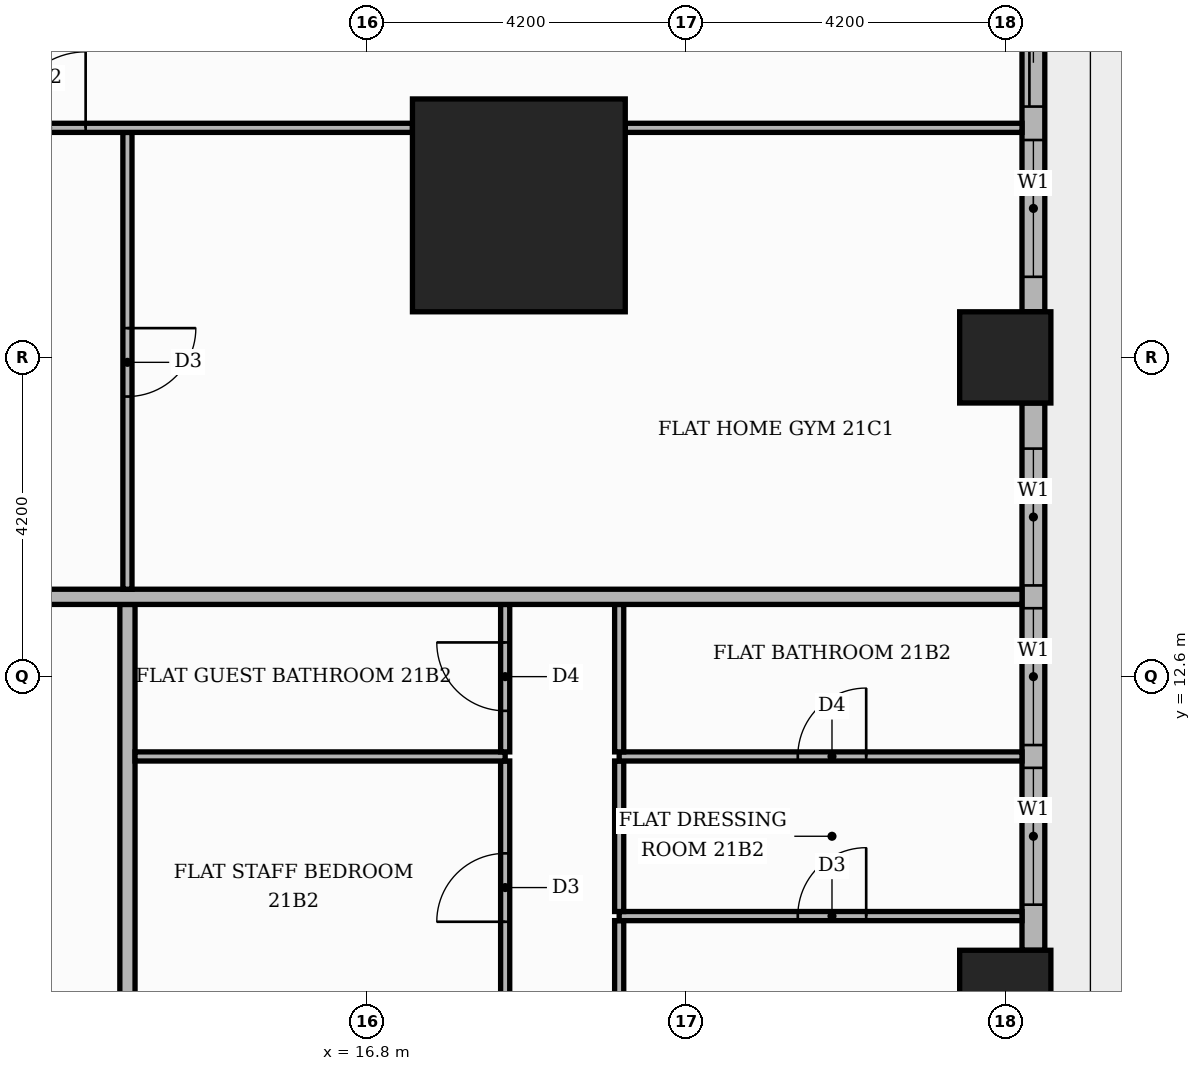
"""IFC4 building model, lengths in metres.
Left out: names, types, materials, properties, quantities, classifications, styles, units other than length and angle.
Written with IfcOpenShell. Run it as: python <this file> out.ifc"""

import sys

from ifc_helpers import new_model, si_unit, direction, frame, frame_2d, origin, origin_2d, place, context, subcontext, project, spatial, rectangle, extrude, element, fill, save


model = new_model("IFC4")
c1 = context("Model", 3, precision=1e-05, world=origin(), true_north=direction((0.0, 1.0)))
c2 = subcontext(c1, "Body", "Model", "MODEL_VIEW")
j1 = project(units=[si_unit("LENGTHUNIT", "METRE"), si_unit("PLANEANGLEUNIT", "RADIAN")], contexts=[c1])
p1 = place(None, origin())
s1 = spatial("IfcSite", under=j1, at=p1, CompositionType="ELEMENT")
p2 = place(p1, origin())
s2 = spatial("IfcBuilding", under=s1, at=p2, CompositionType="ELEMENT")
p3 = place(p2, frame((0.0, 0.0, 90.9)))
s3 = spatial("IfcBuildingStorey", under=s2, at=p3, CompositionType="ELEMENT", Elevation=90.9)
p4 = place(p3, frame((18.8, 18.8, 0.0), z_axis=(0.0, 0.0, 1.0), x_axis=(1.0, 0.0, 0.0)))
e1 = element("IfcColumn", 1, at=p4, inside=s3, PredefinedType="COLUMN", context=c2, shape_type="SweptSolid", body=[
    extrude(rectangle(XDim=2.8, YDim=2.8, at=origin_2d()), origin(), (0.0, 0.0, 1.0), 3.9),
])
for number, where, z_axis, x_axis in (
    (2, (25.2, 8.4, 0.0), (0.0, 0.0, 1.0), (1.0, 0.0, 0.0)),
    (3, (25.2, 16.8, 0.0), (0.0, 0.0, 1.0), (1.0, 0.0, 0.0)),
):
    element("IfcColumn", number, at=place(p3, frame(where, z_axis=z_axis, x_axis=x_axis)), inside=s3, PredefinedType="COLUMN", context=c2, shape_type="SweptSolid", body=[
        extrude(rectangle(XDim=1.2, YDim=1.2, at=origin_2d()), origin(), (0.0, 0.0, 1.0), 3.9),
    ])
p5 = place(p3, frame((25.57, 9.0, 0.0), z_axis=(0.0, 0.0, 1.0), x_axis=(0.0, 1.0, 0.0)))
e4 = element("IfcWall", 4, at=p5, inside=s3, PredefinedType="STANDARD", context=c2, shape_type="SweptSolid", body=[
    extrude(rectangle(XDim=7.2, YDim=0.3, at=frame_2d((3.6, 0.0))), origin(), (0.0, 0.0, 1.0), 3.48),
])
p6 = place(p5, frame((0.6, 0.0, 0.9)))
e5 = element("IfcOpeningElement", 5, at=p6, cuts=e4, PredefinedType="OPENING", context=c2, shape_type="SweptSolid", body=[
    extrude(rectangle(XDim=1.8, YDim=2.1, at=frame_2d((0.9, 1.05))), frame((0.0, 0.16, 0.0), z_axis=(0.0, -1.0, 0.0), x_axis=(1.0, 0.0, 0.0)), (0.0, 0.0, 1.0), 0.32),
])
p7 = place(p5, frame((2.7, 0.0, 0.9)))
e6 = element("IfcOpeningElement", 6, at=p7, cuts=e4, PredefinedType="OPENING", context=c2, shape_type="SweptSolid", body=[
    extrude(rectangle(XDim=1.8, YDim=2.1, at=frame_2d((0.9, 1.05))), frame((0.0, 0.16, 0.0), z_axis=(0.0, -1.0, 0.0), x_axis=(1.0, 0.0, 0.0)), (0.0, 0.0, 1.0), 0.32),
])
p8 = place(p5, frame((4.8, 0.0, 0.9)))
e7 = element("IfcOpeningElement", 7, at=p8, cuts=e4, PredefinedType="OPENING", context=c2, shape_type="SweptSolid", body=[
    extrude(rectangle(XDim=1.8, YDim=2.1, at=frame_2d((0.9, 1.05))), frame((0.0, 0.16, 0.0), z_axis=(0.0, -1.0, 0.0), x_axis=(1.0, 0.0, 0.0)), (0.0, 0.0, 1.0), 0.32),
])
p9 = place(p3, frame((25.57, 17.4, 0.0), z_axis=(0.0, 0.0, 1.0), x_axis=(0.0, 1.0, 0.0)))
e8 = element("IfcWall", 8, at=p9, inside=s3, PredefinedType="STANDARD", context=c2, shape_type="SweptSolid", body=[
    extrude(rectangle(XDim=4.82, YDim=0.3, at=frame_2d((2.41, 0.0))), origin(), (0.0, 0.0, 1.0), 3.48),
])
p10 = place(p9, frame((2.7, 0.0, 0.0)))
e9 = element("IfcOpeningElement", 9, at=p10, cuts=e8, PredefinedType="OPENING", context=c2, shape_type="SweptSolid", body=[
    extrude(rectangle(XDim=1.8, YDim=2.4, at=frame_2d((0.9, 1.2))), frame((0.0, 0.16, 0.0), z_axis=(0.0, -1.0, 0.0), x_axis=(1.0, 0.0, 0.0)), (0.0, 0.0, 1.0), 0.32),
])
p11 = place(p9, frame((0.46, 0.0, 0.9)))
e10 = element("IfcOpeningElement", 10, at=p11, cuts=e8, PredefinedType="OPENING", context=c2, shape_type="SweptSolid", body=[
    extrude(rectangle(XDim=1.8, YDim=2.1, at=frame_2d((0.9, 1.05))), frame((0.0, 0.16, 0.0), z_axis=(0.0, -1.0, 0.0), x_axis=(1.0, 0.0, 0.0)), (0.0, 0.0, 1.0), 0.32),
])
p12 = place(p3, frame((13.65, -5.15, 0.0), z_axis=(0.0, 0.0, 1.0), x_axis=(0.0, 1.0, 0.0)))
e11 = element("IfcWall", 11, at=p12, inside=s3, PredefinedType="PARTITIONING", context=c2, shape_type="SweptSolid", body=[
    extrude(rectangle(XDim=18.7, YDim=0.2, at=frame_2d((9.35, 0.0))), origin(), (0.0, 0.0, 1.0), 3.48),
])
p13 = place(p12, frame((1.45, 0.0, 0.0)))
e12 = element("IfcOpeningElement", 12, at=p13, cuts=e11, PredefinedType="OPENING", context=c2, shape_type="SweptSolid", body=[
    extrude(rectangle(XDim=1.1, YDim=2.4, at=frame_2d((0.55, 1.2))), frame((0.0, 0.11, 0.0), z_axis=(0.0, -1.0, 0.0), x_axis=(1.0, 0.0, 0.0)), (0.0, 0.0, 1.0), 0.22),
])
p14 = place(p3, frame((20.12, 5.31, 0.0), z_axis=(0.0, 0.0, 1.0), x_axis=(0.0, 1.0, 0.0)))
e13 = element("IfcWall", 13, at=p14, inside=s3, PredefinedType="PARTITIONING", context=c2, shape_type="SweptSolid", body=[
    extrude(rectangle(XDim=4.08, YDim=0.12, at=frame_2d((2.04, 0.0))), origin(), (0.0, 0.0, 1.0), 3.48),
])
p15 = place(p14, frame((1.59, 0.0, 0.0)))
e14 = element("IfcOpeningElement", 14, at=p15, cuts=e13, PredefinedType="OPENING", context=c2, shape_type="SweptSolid", body=[
    extrude(rectangle(XDim=0.9, YDim=2.1, at=frame_2d((0.45, 1.05))), frame((0.0, 0.07, 0.0), z_axis=(0.0, -1.0, 0.0), x_axis=(1.0, 0.0, 0.0)), (0.0, 0.0, 1.0), 0.14),
])
p16 = place(p3, frame((18.62, 8.16, 0.0), z_axis=(0.0, 0.0, 1.0), x_axis=(0.0, 1.0, 0.0)))
e15 = element("IfcWall", 15, at=p16, inside=s3, PredefinedType="PARTITIONING", context=c2, shape_type="SweptSolid", body=[
    extrude(rectangle(XDim=3.33, YDim=0.12, at=frame_2d((1.665, 0.0))), origin(), (0.0, 0.0, 1.0), 3.48),
])
p17 = place(p16, frame((1.215, 0.0, 0.0)))
e16 = element("IfcOpeningElement", 16, at=p17, cuts=e15, PredefinedType="OPENING", context=c2, shape_type="SweptSolid", body=[
    extrude(rectangle(XDim=0.9, YDim=2.1, at=frame_2d((0.45, 1.05))), frame((0.0, 0.07, 0.0), z_axis=(0.0, -1.0, 0.0), x_axis=(1.0, 0.0, 0.0)), (0.0, 0.0, 1.0), 0.14),
])
p18 = place(p3, frame((20.12, 9.45, 0.0), z_axis=(0.0, 0.0, 1.0), x_axis=(1.0, 0.0, 0.0)))
e17 = element("IfcWall", 17, at=p18, inside=s3, PredefinedType="PARTITIONING", context=c2, shape_type="SweptSolid", body=[
    extrude(rectangle(XDim=5.3, YDim=0.12, at=frame_2d((2.65, 0.0))), origin(), (0.0, 0.0, 1.0), 3.48),
])
p19 = place(p18, frame((2.35, 0.0, 0.0)))
e18 = element("IfcOpeningElement", 18, at=p19, cuts=e17, PredefinedType="OPENING", context=c2, shape_type="SweptSolid", body=[
    extrude(rectangle(XDim=0.9, YDim=2.1, at=frame_2d((0.45, 1.05))), frame((0.0, 0.07, 0.0), z_axis=(0.0, -1.0, 0.0), x_axis=(1.0, 0.0, 0.0)), (0.0, 0.0, 1.0), 0.14),
])
p20 = place(p3, frame((20.12, 9.51, 0.0), z_axis=(0.0, 0.0, 1.0), x_axis=(0.0, 1.0, 0.0)))
e19 = element("IfcWall", 19, at=p20, inside=s3, PredefinedType="PARTITIONING", context=c2, shape_type="SweptSolid", body=[
    extrude(rectangle(XDim=1.98, YDim=0.12, at=frame_2d((0.99, 0.0))), origin(), (0.0, 0.0, 1.0), 3.48),
])
p21 = place(p3, frame((13.75, 11.55, 0.0), z_axis=(0.0, 0.0, 1.0), x_axis=(1.0, 0.0, 0.0)))
e20 = element("IfcWall", 20, at=p21, inside=s3, PredefinedType="PARTITIONING", context=c2, shape_type="SweptSolid", body=[
    extrude(rectangle(XDim=4.87, YDim=0.12, at=frame_2d((2.435, 0.0))), origin(), (0.0, 0.0, 1.0), 3.48),
])
p22 = place(p3, frame((20.12, 11.55, 0.0), z_axis=(0.0, 0.0, 1.0), x_axis=(1.0, 0.0, 0.0)))
e21 = element("IfcWall", 21, at=p22, inside=s3, PredefinedType="PARTITIONING", context=c2, shape_type="SweptSolid", body=[
    extrude(rectangle(XDim=5.3, YDim=0.12, at=frame_2d((2.65, 0.0))), origin(), (0.0, 0.0, 1.0), 3.48),
])
p23 = place(p22, frame((2.35, 0.0, 0.0)))
e22 = element("IfcOpeningElement", 22, at=p23, cuts=e21, PredefinedType="OPENING", context=c2, shape_type="SweptSolid", body=[
    extrude(rectangle(XDim=0.9, YDim=2.1, at=frame_2d((0.45, 1.05))), frame((0.0, 0.07, 0.0), z_axis=(0.0, -1.0, 0.0), x_axis=(1.0, 0.0, 0.0)), (0.0, 0.0, 1.0), 0.14),
])
p24 = place(p3, frame((18.62, 11.61, 0.0), z_axis=(0.0, 0.0, 1.0), x_axis=(0.0, 1.0, 0.0)))
e23 = element("IfcWall", 23, at=p24, inside=s3, PredefinedType="PARTITIONING", context=c2, shape_type="SweptSolid", body=[
    extrude(rectangle(XDim=1.94, YDim=0.12, at=frame_2d((0.97, 0.0))), origin(), (0.0, 0.0, 1.0), 3.48),
])
p25 = place(p24, frame((0.54, 0.0, 0.0)))
e24 = element("IfcOpeningElement", 24, at=p25, cuts=e23, PredefinedType="OPENING", context=c2, shape_type="SweptSolid", body=[
    extrude(rectangle(XDim=0.9, YDim=2.1, at=frame_2d((0.45, 1.05))), frame((0.0, 0.07, 0.0), z_axis=(0.0, -1.0, 0.0), x_axis=(1.0, 0.0, 0.0)), (0.0, 0.0, 1.0), 0.14),
])
p26 = place(p3, frame((20.12, 11.61, 0.0), z_axis=(0.0, 0.0, 1.0), x_axis=(0.0, 1.0, 0.0)))
e25 = element("IfcWall", 25, at=p26, inside=s3, PredefinedType="PARTITIONING", context=c2, shape_type="SweptSolid", body=[
    extrude(rectangle(XDim=1.94, YDim=0.12, at=frame_2d((0.97, 0.0))), origin(), (0.0, 0.0, 1.0), 3.48),
])
p27 = place(p3, frame((-13.65, 13.65, 0.0), z_axis=(0.0, 0.0, 1.0), x_axis=(1.0, 0.0, 0.0)))
e26 = element("IfcWall", 26, at=p27, inside=s3, PredefinedType="PARTITIONING", context=c2, shape_type="SweptSolid", body=[
    extrude(rectangle(XDim=39.07, YDim=0.2, at=frame_2d((19.535, 0.0))), origin(), (0.0, 0.0, 1.0), 3.48),
])
p28 = place(p27, frame((23.6, 0.0, 0.0)))
e27 = element("IfcOpeningElement", 27, at=p28, cuts=e26, PredefinedType="OPENING", context=c2, shape_type="SweptSolid", body=[
    extrude(rectangle(XDim=1.1, YDim=2.4, at=frame_2d((0.55, 1.2))), frame((0.0, 0.11, 0.0), z_axis=(0.0, -1.0, 0.0), x_axis=(1.0, 0.0, 0.0)), (0.0, 0.0, 1.0), 0.22),
])
p29 = place(p3, frame((13.65, 13.75, 0.0), z_axis=(0.0, 0.0, 1.0), x_axis=(0.0, 1.0, 0.0)))
e28 = element("IfcWall", 28, at=p29, inside=s3, PredefinedType="PARTITIONING", context=c2, shape_type="SweptSolid", body=[
    extrude(rectangle(XDim=6.01, YDim=0.12, at=frame_2d((3.005, 0.0))), origin(), (0.0, 0.0, 1.0), 3.48),
])
p30 = place(p29, frame((2.535, 0.0, 0.0)))
e29 = element("IfcOpeningElement", 29, at=p30, cuts=e28, PredefinedType="OPENING", context=c2, shape_type="SweptSolid", body=[
    extrude(rectangle(XDim=0.9, YDim=2.1, at=frame_2d((0.45, 1.05))), frame((0.0, 0.07, 0.0), z_axis=(0.0, -1.0, 0.0), x_axis=(1.0, 0.0, 0.0)), (0.0, 0.0, 1.0), 0.14),
])
p31 = place(p3, frame((-13.55, 19.82, 0.0), z_axis=(0.0, 0.0, 1.0), x_axis=(1.0, 0.0, 0.0)))
e30 = element("IfcWall", 30, at=p31, inside=s3, PredefinedType="PARTITIONING", context=c2, shape_type="SweptSolid", body=[
    extrude(rectangle(XDim=30.95, YDim=0.12, at=frame_2d((15.475, 0.0))), origin(), (0.0, 0.0, 1.0), 3.48),
])
p32 = place(p31, frame((25.65, 0.0, 0.0)))
e31 = element("IfcOpeningElement", 31, at=p32, cuts=e30, PredefinedType="OPENING", context=c2, shape_type="SweptSolid", body=[
    extrude(rectangle(XDim=1.0, YDim=2.1, at=frame_2d((0.5, 1.05))), frame((0.0, 0.07, 0.0), z_axis=(0.0, -1.0, 0.0), x_axis=(1.0, 0.0, 0.0)), (0.0, 0.0, 1.0), 0.14),
])
p33 = place(p31, frame((20.4, 0.0, 0.0)))
e32 = element("IfcOpeningElement", 32, at=p33, cuts=e30, PredefinedType="OPENING", context=c2, shape_type="SweptSolid", body=[
    extrude(rectangle(XDim=1.0, YDim=2.1, at=frame_2d((0.5, 1.05))), frame((0.0, 0.07, 0.0), z_axis=(0.0, -1.0, 0.0), x_axis=(1.0, 0.0, 0.0)), (0.0, 0.0, 1.0), 0.14),
])
p34 = place(p31, frame((13.1, 0.0, 0.0)))
e33 = element("IfcOpeningElement", 33, at=p34, cuts=e30, PredefinedType="OPENING", context=c2, shape_type="SweptSolid", body=[
    extrude(rectangle(XDim=0.9, YDim=2.1, at=frame_2d((0.45, 1.05))), frame((0.0, 0.07, 0.0), z_axis=(0.0, -1.0, 0.0), x_axis=(1.0, 0.0, 0.0)), (0.0, 0.0, 1.0), 0.14),
])
p35 = place(p31, frame((3.65, 0.0, 0.0)))
e34 = element("IfcOpeningElement", 34, at=p35, cuts=e30, PredefinedType="OPENING", context=c2, shape_type="SweptSolid", body=[
    extrude(rectangle(XDim=0.9, YDim=2.1, at=frame_2d((0.45, 1.05))), frame((0.0, 0.07, 0.0), z_axis=(0.0, -1.0, 0.0), x_axis=(1.0, 0.0, 0.0)), (0.0, 0.0, 1.0), 0.14),
])
p36 = place(p3, frame((20.2, 19.82, 0.0), z_axis=(0.0, 0.0, 1.0), x_axis=(1.0, 0.0, 0.0)))
e35 = element("IfcWall", 35, at=p36, inside=s3, PredefinedType="PARTITIONING", context=c2, shape_type="SweptSolid", body=[
    extrude(rectangle(XDim=5.22, YDim=0.12, at=frame_2d((2.61, 0.0))), origin(), (0.0, 0.0, 1.0), 3.48),
])
p37 = place(p6, origin())
e36 = element("IfcWindow", 36, at=p37, inside=s3, PartitioningType="SINGLE_PANEL", PredefinedType="WINDOW", context=c2, shape_type="SweptSolid", body=[
    extrude(rectangle(XDim=1.8, YDim=2.1, at=frame_2d((0.9, 1.05))), frame((0.0, 0.03, 0.0), z_axis=(0.0, -1.0, 0.0), x_axis=(1.0, 0.0, 0.0)), (0.0, 0.0, 1.0), 0.06),
])
fill(e5, e36)
p38 = place(p7, origin())
e37 = element("IfcWindow", 37, at=p38, inside=s3, PartitioningType="SINGLE_PANEL", PredefinedType="WINDOW", context=c2, shape_type="SweptSolid", body=[
    extrude(rectangle(XDim=1.8, YDim=2.1, at=frame_2d((0.9, 1.05))), frame((0.0, 0.03, 0.0), z_axis=(0.0, -1.0, 0.0), x_axis=(1.0, 0.0, 0.0)), (0.0, 0.0, 1.0), 0.06),
])
fill(e6, e37)
p39 = place(p8, origin())
e38 = element("IfcWindow", 38, at=p39, inside=s3, PartitioningType="SINGLE_PANEL", PredefinedType="WINDOW", context=c2, shape_type="SweptSolid", body=[
    extrude(rectangle(XDim=1.8, YDim=2.1, at=frame_2d((0.9, 1.05))), frame((0.0, 0.03, 0.0), z_axis=(0.0, -1.0, 0.0), x_axis=(1.0, 0.0, 0.0)), (0.0, 0.0, 1.0), 0.06),
])
fill(e7, e38)
p40 = place(p10, origin())
e39 = element("IfcDoor", 39, at=p40, inside=s3, OperationType="SLIDING_TO_LEFT", PredefinedType="DOOR", context=c2, shape_type="SweptSolid", body=[
    extrude(rectangle(XDim=1.8, YDim=2.4, at=frame_2d((0.9, 1.2))), frame((0.0, 0.025, 0.0), z_axis=(0.0, -1.0, 0.0), x_axis=(1.0, 0.0, 0.0)), (0.0, 0.0, 1.0), 0.05),
])
fill(e9, e39)
p41 = place(p11, origin())
e40 = element("IfcWindow", 40, at=p41, inside=s3, PartitioningType="SINGLE_PANEL", PredefinedType="WINDOW", context=c2, shape_type="SweptSolid", body=[
    extrude(rectangle(XDim=1.8, YDim=2.1, at=frame_2d((0.9, 1.05))), frame((0.0, 0.03, 0.0), z_axis=(0.0, -1.0, 0.0), x_axis=(1.0, 0.0, 0.0)), (0.0, 0.0, 1.0), 0.06),
])
fill(e10, e40)
p42 = place(p17, origin())
e41 = element("IfcDoor", 41, at=p42, inside=s3, OperationType="SINGLE_SWING_LEFT", PredefinedType="DOOR", context=c2, shape_type="SweptSolid", body=[
    extrude(rectangle(XDim=0.9, YDim=2.1, at=frame_2d((0.45, 1.05))), frame((0.0, 0.025, 0.0), z_axis=(0.0, -1.0, 0.0), x_axis=(1.0, 0.0, 0.0)), (0.0, 0.0, 1.0), 0.05),
])
fill(e16, e41)
p43 = place(p25, origin())
e42 = element("IfcDoor", 42, at=p43, inside=s3, OperationType="SINGLE_SWING_RIGHT", PredefinedType="DOOR", context=c2, shape_type="SweptSolid", body=[
    extrude(rectangle(XDim=0.9, YDim=2.1, at=frame_2d((0.45, 1.05))), frame((0.0, 0.025, 0.0), z_axis=(0.0, -1.0, 0.0), x_axis=(1.0, 0.0, 0.0)), (0.0, 0.0, 1.0), 0.05),
])
fill(e24, e42)
p44 = place(p19, origin())
e43 = element("IfcDoor", 43, at=p44, inside=s3, OperationType="SINGLE_SWING_RIGHT", PredefinedType="DOOR", context=c2, shape_type="SweptSolid", body=[
    extrude(rectangle(XDim=0.9, YDim=2.1, at=frame_2d((0.45, 1.05))), frame((0.0, 0.025, 0.0), z_axis=(0.0, -1.0, 0.0), x_axis=(1.0, 0.0, 0.0)), (0.0, 0.0, 1.0), 0.05),
])
fill(e18, e43)
p45 = place(p23, origin())
e44 = element("IfcDoor", 44, at=p45, inside=s3, OperationType="SINGLE_SWING_RIGHT", PredefinedType="DOOR", context=c2, shape_type="SweptSolid", body=[
    extrude(rectangle(XDim=0.9, YDim=2.1, at=frame_2d((0.45, 1.05))), frame((0.0, 0.025, 0.0), z_axis=(0.0, -1.0, 0.0), x_axis=(1.0, 0.0, 0.0)), (0.0, 0.0, 1.0), 0.05),
])
fill(e22, e44)
p46 = place(p30, frame((0.9, 0.0, 0.0), z_axis=(0.0, 0.0, 1.0), x_axis=(-1.0, 0.0, 0.0)))
e45 = element("IfcDoor", 45, at=p46, inside=s3, OperationType="SINGLE_SWING_RIGHT", PredefinedType="DOOR", context=c2, shape_type="SweptSolid", body=[
    extrude(rectangle(XDim=0.9, YDim=2.1, at=frame_2d((0.45, 1.05))), frame((0.0, 0.025, 0.0), z_axis=(0.0, -1.0, 0.0), x_axis=(1.0, 0.0, 0.0)), (0.0, 0.0, 1.0), 0.05),
])
fill(e29, e45)
p47 = place(p32, origin())
e46 = element("IfcDoor", 46, at=p47, inside=s3, OperationType="SINGLE_SWING_RIGHT", PredefinedType="DOOR", context=c2, shape_type="SweptSolid", body=[
    extrude(rectangle(XDim=1.0, YDim=2.1, at=frame_2d((0.5, 1.05))), frame((0.0, 0.025, 0.0), z_axis=(0.0, -1.0, 0.0), x_axis=(1.0, 0.0, 0.0)), (0.0, 0.0, 1.0), 0.05),
])
fill(e31, e46)
save(model, sys.argv[1])
